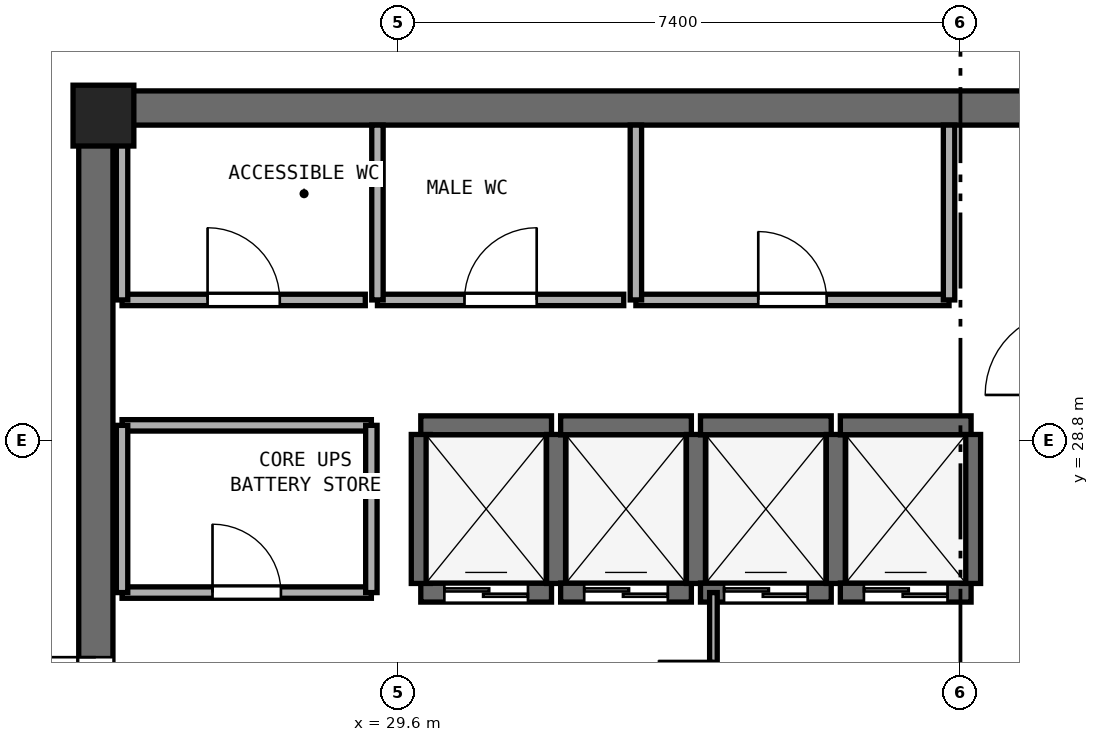
"""IFC4 building model, lengths in metres.
Left out: names, types, materials, properties, quantities, classifications, styles, units other than length and angle.
Written with IfcOpenShell. Run it as: python <this file> out.ifc"""

import sys

from ifc_helpers import new_model, si_unit, direction, frame, frame_2d, origin, origin_2d, place, context, subcontext, project, spatial, rectangle, extrude, element, fill, save


model = new_model("IFC4")
c1 = context("Model", 3, precision=1e-05, world=origin(), true_north=direction((0.0, 1.0)))
c2 = subcontext(c1, "Body", "Model", "MODEL_VIEW")
j1 = project(units=[si_unit("LENGTHUNIT", "METRE"), si_unit("PLANEANGLEUNIT", "RADIAN")], contexts=[c1])
p1 = place(None, origin())
s1 = spatial("IfcSite", under=j1, at=p1, CompositionType="ELEMENT")
p2 = place(p1, origin())
s2 = spatial("IfcBuilding", under=s1, at=p2, CompositionType="ELEMENT")
p3 = place(p2, frame((0.0, 0.0, 251.6)))
s3 = spatial("IfcBuildingStorey", under=s2, at=p3, CompositionType="ELEMENT", Elevation=251.6)
p4 = place(p3, frame((25.4, 33.175, 0.0), z_axis=(0.0, 0.0, 1.0), x_axis=(1.0, 0.0, 0.0)))
e1 = element("IfcWall", 1, at=p4, inside=s3, PredefinedType="SHEAR", context=c2, shape_type="SweptSolid", body=[
    extrude(rectangle(XDim=23.2, YDim=0.45, at=frame_2d((11.6, 0.0))), origin(), (0.0, 0.0, 1.0), 3.51),
])
p5 = place(p3, frame((25.625, 17.45, 0.0), z_axis=(0.0, 0.0, 1.0), x_axis=(0.0, 1.0, 0.0)))
e2 = element("IfcWall", 2, at=p5, inside=s3, PredefinedType="SHEAR", context=c2, shape_type="SweptSolid", body=[
    extrude(rectangle(XDim=15.5, YDim=0.45, at=frame_2d((7.75, 0.0))), origin(), (0.0, 0.0, 1.0), 3.51),
])
p6 = place(p5, frame((7.0, 0.0, 0.0)))
e3 = element("IfcOpeningElement", 3, at=p6, cuts=e2, PredefinedType="OPENING", context=c2, shape_type="SweptSolid", body=[
    extrude(rectangle(XDim=1.5, YDim=2.15, at=frame_2d((0.75, 1.075))), frame((0.0, 0.235, 0.0), z_axis=(0.0, -1.0, 0.0), x_axis=(1.0, 0.0, 0.0)), (0.0, 0.0, 1.0), 0.47),
])
p7 = place(p3, frame((25.725, 33.075, 0.0), z_axis=(0.0, 0.0, 1.0), x_axis=(1.0, 0.0, 0.0)))
e4 = element("IfcColumn", 4, at=p7, inside=s3, PredefinedType="PILASTER", context=c2, shape_type="SweptSolid", body=[
    extrude(rectangle(XDim=0.8, YDim=0.8, at=origin_2d()), origin(), (0.0, 0.0, 1.0), 3.8),
])
p8 = place(p3, frame((29.9, 26.8, 0.0), z_axis=(0.0, 0.0, 1.0), x_axis=(1.0, 0.0, 0.0)))
e5 = element("IfcWall", 5, at=p8, inside=s3, PredefinedType="SHEAR", context=c2, shape_type="SweptSolid", body=[
    extrude(rectangle(XDim=1.72, YDim=0.25, at=frame_2d((0.86, 0.0))), origin(), (0.0, 0.0, 1.0), 3.51),
])
p9 = place(p8, frame((0.31, 0.0, 0.0)))
e6 = element("IfcOpeningElement", 6, at=p9, cuts=e5, PredefinedType="OPENING", context=c2, shape_type="SweptSolid", body=[
    extrude(rectangle(XDim=1.1, YDim=2.15, at=frame_2d((0.55, 1.075))), frame((0.0, 0.135, 0.0), z_axis=(0.0, -1.0, 0.0), x_axis=(1.0, 0.0, 0.0)), (0.0, 0.0, 1.0), 0.27),
])
p10 = place(p3, frame((29.9, 29.0, 0.0), z_axis=(0.0, 0.0, 1.0), x_axis=(1.0, 0.0, 0.0)))
e7 = element("IfcWall", 7, at=p10, inside=s3, PredefinedType="SHEAR", context=c2, shape_type="SweptSolid", body=[
    extrude(rectangle(XDim=1.72, YDim=0.25, at=frame_2d((0.86, 0.0))), origin(), (0.0, 0.0, 1.0), 3.51),
])
for number, where, z_axis, x_axis in (
    (8, (29.9, 26.92, 0.0), (0.0, 0.0, 1.0), (0.0, 1.0, 0.0)),
    (9, (31.68, 26.92, 0.0), (0.0, 0.0, 1.0), (0.0, 1.0, 0.0)),
):
    element("IfcWall", number, at=place(p3, frame(where, z_axis=z_axis, x_axis=x_axis)), inside=s3, PredefinedType="SHEAR", context=c2, shape_type="SweptSolid", body=[
        extrude(rectangle(XDim=1.96, YDim=0.25, at=frame_2d((0.98, 0.0))), origin(), (0.0, 0.0, 1.0), 3.51),
    ])
p11 = place(p3, frame((31.74, 26.8, 0.0), z_axis=(0.0, 0.0, 1.0), x_axis=(1.0, 0.0, 0.0)))
e10 = element("IfcWall", 10, at=p11, inside=s3, PredefinedType="SHEAR", context=c2, shape_type="SweptSolid", body=[
    extrude(rectangle(XDim=1.72, YDim=0.25, at=frame_2d((0.86, 0.0))), origin(), (0.0, 0.0, 1.0), 3.51),
])
p12 = place(p11, frame((0.31, 0.0, 0.0)))
e11 = element("IfcOpeningElement", 11, at=p12, cuts=e10, PredefinedType="OPENING", context=c2, shape_type="SweptSolid", body=[
    extrude(rectangle(XDim=1.1, YDim=2.15, at=frame_2d((0.55, 1.075))), frame((0.0, 0.135, 0.0), z_axis=(0.0, -1.0, 0.0), x_axis=(1.0, 0.0, 0.0)), (0.0, 0.0, 1.0), 0.27),
])
p13 = place(p3, frame((31.74, 29.0, 0.0), z_axis=(0.0, 0.0, 1.0), x_axis=(1.0, 0.0, 0.0)))
e12 = element("IfcWall", 12, at=p13, inside=s3, PredefinedType="SHEAR", context=c2, shape_type="SweptSolid", body=[
    extrude(rectangle(XDim=1.72, YDim=0.25, at=frame_2d((0.86, 0.0))), origin(), (0.0, 0.0, 1.0), 3.51),
])
p14 = place(p3, frame((33.52, 26.92, 0.0), z_axis=(0.0, 0.0, 1.0), x_axis=(0.0, 1.0, 0.0)))
e13 = element("IfcWall", 13, at=p14, inside=s3, PredefinedType="SHEAR", context=c2, shape_type="SweptSolid", body=[
    extrude(rectangle(XDim=1.96, YDim=0.25, at=frame_2d((0.98, 0.0))), origin(), (0.0, 0.0, 1.0), 3.51),
])
p15 = place(p3, frame((33.58, 26.8, 0.0), z_axis=(0.0, 0.0, 1.0), x_axis=(1.0, 0.0, 0.0)))
e14 = element("IfcWall", 14, at=p15, inside=s3, PredefinedType="SHEAR", context=c2, shape_type="SweptSolid", body=[
    extrude(rectangle(XDim=1.72, YDim=0.25, at=frame_2d((0.86, 0.0))), origin(), (0.0, 0.0, 1.0), 3.51),
])
p16 = place(p15, frame((0.31, 0.0, 0.0)))
e15 = element("IfcOpeningElement", 15, at=p16, cuts=e14, PredefinedType="OPENING", context=c2, shape_type="SweptSolid", body=[
    extrude(rectangle(XDim=1.1, YDim=2.15, at=frame_2d((0.55, 1.075))), frame((0.0, 0.135, 0.0), z_axis=(0.0, -1.0, 0.0), x_axis=(1.0, 0.0, 0.0)), (0.0, 0.0, 1.0), 0.27),
])
p17 = place(p3, frame((33.58, 29.0, 0.0), z_axis=(0.0, 0.0, 1.0), x_axis=(1.0, 0.0, 0.0)))
e16 = element("IfcWall", 16, at=p17, inside=s3, PredefinedType="SHEAR", context=c2, shape_type="SweptSolid", body=[
    extrude(rectangle(XDim=1.72, YDim=0.25, at=frame_2d((0.86, 0.0))), origin(), (0.0, 0.0, 1.0), 3.51),
])
p18 = place(p3, frame((35.36, 26.92, 0.0), z_axis=(0.0, 0.0, 1.0), x_axis=(0.0, 1.0, 0.0)))
e17 = element("IfcWall", 17, at=p18, inside=s3, PredefinedType="SHEAR", context=c2, shape_type="SweptSolid", body=[
    extrude(rectangle(XDim=1.96, YDim=0.25, at=frame_2d((0.98, 0.0))), origin(), (0.0, 0.0, 1.0), 3.51),
])
p19 = place(p3, frame((35.42, 26.8, 0.0), z_axis=(0.0, 0.0, 1.0), x_axis=(1.0, 0.0, 0.0)))
e18 = element("IfcWall", 18, at=p19, inside=s3, PredefinedType="SHEAR", context=c2, shape_type="SweptSolid", body=[
    extrude(rectangle(XDim=1.72, YDim=0.25, at=frame_2d((0.86, 0.0))), origin(), (0.0, 0.0, 1.0), 3.51),
])
p20 = place(p19, frame((0.31, 0.0, 0.0)))
e19 = element("IfcOpeningElement", 19, at=p20, cuts=e18, PredefinedType="OPENING", context=c2, shape_type="SweptSolid", body=[
    extrude(rectangle(XDim=1.1, YDim=2.15, at=frame_2d((0.55, 1.075))), frame((0.0, 0.135, 0.0), z_axis=(0.0, -1.0, 0.0), x_axis=(1.0, 0.0, 0.0)), (0.0, 0.0, 1.0), 0.27),
])
p21 = place(p3, frame((35.42, 29.0, 0.0), z_axis=(0.0, 0.0, 1.0), x_axis=(1.0, 0.0, 0.0)))
e20 = element("IfcWall", 20, at=p21, inside=s3, PredefinedType="SHEAR", context=c2, shape_type="SweptSolid", body=[
    extrude(rectangle(XDim=1.72, YDim=0.25, at=frame_2d((0.86, 0.0))), origin(), (0.0, 0.0, 1.0), 3.51),
])
p22 = place(p3, frame((37.14, 26.92, 0.0), z_axis=(0.0, 0.0, 1.0), x_axis=(0.0, 1.0, 0.0)))
e21 = element("IfcWall", 21, at=p22, inside=s3, PredefinedType="SHEAR", context=c2, shape_type="SweptSolid", body=[
    extrude(rectangle(XDim=1.96, YDim=0.25, at=frame_2d((0.98, 0.0))), origin(), (0.0, 0.0, 1.0), 3.51),
])
p23 = place(p3, frame((25.97, 30.65, 0.0), z_axis=(0.0, 0.0, 1.0), x_axis=(1.0, 0.0, 0.0)))
e22 = element("IfcWall", 22, at=p23, inside=s3, PredefinedType="PARTITIONING", context=c2, shape_type="SweptSolid", body=[
    extrude(rectangle(XDim=3.2, YDim=0.15, at=frame_2d((1.6, 0.0))), origin(), (0.0, 0.0, 1.0), 3.51),
])
p24 = place(p23, frame((1.125, 0.0, 0.0)))
e23 = element("IfcOpeningElement", 23, at=p24, cuts=e22, PredefinedType="OPENING", context=c2, shape_type="SweptSolid", body=[
    extrude(rectangle(XDim=0.95, YDim=2.1, at=frame_2d((0.475, 1.05))), frame((0.0, 0.085, 0.0), z_axis=(0.0, -1.0, 0.0), x_axis=(1.0, 0.0, 0.0)), (0.0, 0.0, 1.0), 0.17),
])
p25 = place(p3, frame((25.97, 30.65, 0.0), z_axis=(0.0, 0.0, 1.0), x_axis=(0.0, 1.0, 0.0)))
e24 = element("IfcWall", 24, at=p25, inside=s3, PredefinedType="PARTITIONING", context=c2, shape_type="SweptSolid", body=[
    extrude(rectangle(XDim=2.3, YDim=0.15, at=frame_2d((1.15, 0.0))), origin(), (0.0, 0.0, 1.0), 2.61),
])
p26 = place(p3, frame((29.33, 30.65, 0.0), z_axis=(0.0, 0.0, 1.0), x_axis=(1.0, 0.0, 0.0)))
e25 = element("IfcWall", 25, at=p26, inside=s3, PredefinedType="PARTITIONING", context=c2, shape_type="SweptSolid", body=[
    extrude(rectangle(XDim=3.24, YDim=0.15, at=frame_2d((1.62, 0.0))), origin(), (0.0, 0.0, 1.0), 3.51),
])
p27 = place(p26, frame((1.145, 0.0, 0.0)))
e26 = element("IfcOpeningElement", 26, at=p27, cuts=e25, PredefinedType="OPENING", context=c2, shape_type="SweptSolid", body=[
    extrude(rectangle(XDim=0.95, YDim=2.1, at=frame_2d((0.475, 1.05))), frame((0.0, 0.085, 0.0), z_axis=(0.0, -1.0, 0.0), x_axis=(1.0, 0.0, 0.0)), (0.0, 0.0, 1.0), 0.17),
])
p28 = place(p3, frame((29.33, 30.65, 0.0), z_axis=(0.0, 0.0, 1.0), x_axis=(0.0, 1.0, 0.0)))
e27 = element("IfcWall", 27, at=p28, inside=s3, PredefinedType="PARTITIONING", context=c2, shape_type="SweptSolid", body=[
    extrude(rectangle(XDim=2.3, YDim=0.15, at=frame_2d((1.15, 0.0))), origin(), (0.0, 0.0, 1.0), 3.51),
])
p29 = place(p3, frame((32.73, 30.65, 0.0), z_axis=(0.0, 0.0, 1.0), x_axis=(1.0, 0.0, 0.0)))
e28 = element("IfcWall", 28, at=p29, inside=s3, PredefinedType="PARTITIONING", context=c2, shape_type="SweptSolid", body=[
    extrude(rectangle(XDim=4.12, YDim=0.15, at=frame_2d((2.06, 0.0))), origin(), (0.0, 0.0, 1.0), 3.51),
])
p30 = place(p29, frame((1.61, 0.0, 0.0)))
e29 = element("IfcOpeningElement", 29, at=p30, cuts=e28, PredefinedType="OPENING", context=c2, shape_type="SweptSolid", body=[
    extrude(rectangle(XDim=0.9, YDim=2.1, at=frame_2d((0.45, 1.05))), frame((0.0, 0.085, 0.0), z_axis=(0.0, -1.0, 0.0), x_axis=(1.0, 0.0, 0.0)), (0.0, 0.0, 1.0), 0.17),
])
for number, where, z_axis, x_axis in (
    (30, (32.73, 30.65, 0.0), (0.0, 0.0, 1.0), (0.0, 1.0, 0.0)),
    (31, (36.85, 30.65, 0.0), (0.0, 0.0, 1.0), (0.0, 1.0, 0.0)),
):
    element("IfcWall", number, at=place(p3, frame(where, z_axis=z_axis, x_axis=x_axis)), inside=s3, PredefinedType="PARTITIONING", context=c2, shape_type="SweptSolid", body=[
        extrude(rectangle(XDim=2.3, YDim=0.15, at=frame_2d((1.15, 0.0))), origin(), (0.0, 0.0, 1.0), 3.51),
    ])
p31 = place(p3, frame((25.97, 26.8, 0.0), z_axis=(0.0, 0.0, 1.0), x_axis=(1.0, 0.0, 0.0)))
e32 = element("IfcWall", 32, at=p31, inside=s3, PredefinedType="PARTITIONING", context=c2, shape_type="SweptSolid", body=[
    extrude(rectangle(XDim=3.28, YDim=0.15, at=frame_2d((1.64, 0.0))), origin(), (0.0, 0.0, 1.0), 3.51),
])
p32 = place(p31, frame((1.19, 0.0, 0.0)))
e33 = element("IfcOpeningElement", 33, at=p32, cuts=e32, PredefinedType="OPENING", context=c2, shape_type="SweptSolid", body=[
    extrude(rectangle(XDim=0.9, YDim=2.1, at=frame_2d((0.45, 1.05))), frame((0.0, 0.085, 0.0), z_axis=(0.0, -1.0, 0.0), x_axis=(1.0, 0.0, 0.0)), (0.0, 0.0, 1.0), 0.17),
])
p33 = place(p3, frame((25.97, 29.0, 0.0), z_axis=(0.0, 0.0, 1.0), x_axis=(1.0, 0.0, 0.0)))
e34 = element("IfcWall", 34, at=p33, inside=s3, PredefinedType="PARTITIONING", context=c2, shape_type="SweptSolid", body=[
    extrude(rectangle(XDim=3.28, YDim=0.15, at=frame_2d((1.64, 0.0))), origin(), (0.0, 0.0, 1.0), 3.51),
])
p34 = place(p3, frame((25.97, 26.8, 0.0), z_axis=(0.0, 0.0, 1.0), x_axis=(0.0, 1.0, 0.0)))
e35 = element("IfcWall", 35, at=p34, inside=s3, PredefinedType="PARTITIONING", context=c2, shape_type="SweptSolid", body=[
    extrude(rectangle(XDim=2.2, YDim=0.15, at=frame_2d((1.1, 0.0))), origin(), (0.0, 0.0, 1.0), 2.61),
])
p35 = place(p3, frame((29.25, 26.8, 0.0), z_axis=(0.0, 0.0, 1.0), x_axis=(0.0, 1.0, 0.0)))
e36 = element("IfcWall", 36, at=p35, inside=s3, PredefinedType="PARTITIONING", context=c2, shape_type="SweptSolid", body=[
    extrude(rectangle(XDim=2.2, YDim=0.15, at=frame_2d((1.1, 0.0))), origin(), (0.0, 0.0, 1.0), 3.51),
])
p36 = place(p3, frame((33.75, 23.6, 0.0), z_axis=(0.0, 0.0, 1.0), x_axis=(0.0, 1.0, 0.0)))
e37 = element("IfcWall", 37, at=p36, inside=s3, PredefinedType="PARTITIONING", context=c2, shape_type="SweptSolid", body=[
    extrude(rectangle(XDim=3.2, YDim=0.1, at=frame_2d((1.6, 0.0))), origin(), (0.0, 0.0, 1.0), 3.51),
])
p37 = place(p36, frame((0.85, 0.0, 0.0)))
e38 = element("IfcOpeningElement", 38, at=p37, cuts=e37, PredefinedType="OPENING", context=c2, shape_type="SweptSolid", body=[
    extrude(rectangle(XDim=1.45, YDim=2.12, at=frame_2d((0.725, 1.06))), frame((0.0, 0.06, 0.0), z_axis=(0.0, -1.0, 0.0), x_axis=(1.0, 0.0, 0.0)), (0.0, 0.0, 1.0), 0.12),
])
p38 = place(p9, origin())
e39 = element("IfcDoor", 39, at=p38, inside=s3, OperationType="DOUBLE_DOOR_SLIDING", PredefinedType="DOOR", context=c2, shape_type="SweptSolid", body=[
    extrude(rectangle(XDim=1.1, YDim=2.15, at=frame_2d((0.55, 1.075))), frame((0.0, 0.025, 0.0), z_axis=(0.0, -1.0, 0.0), x_axis=(1.0, 0.0, 0.0)), (0.0, 0.0, 1.0), 0.05),
])
fill(e6, e39)
p39 = place(p12, origin())
e40 = element("IfcDoor", 40, at=p39, inside=s3, OperationType="DOUBLE_DOOR_SLIDING", PredefinedType="DOOR", context=c2, shape_type="SweptSolid", body=[
    extrude(rectangle(XDim=1.1, YDim=2.15, at=frame_2d((0.55, 1.075))), frame((0.0, 0.025, 0.0), z_axis=(0.0, -1.0, 0.0), x_axis=(1.0, 0.0, 0.0)), (0.0, 0.0, 1.0), 0.05),
])
fill(e11, e40)
p40 = place(p16, origin())
e41 = element("IfcDoor", 41, at=p40, inside=s3, OperationType="DOUBLE_DOOR_SLIDING", PredefinedType="DOOR", context=c2, shape_type="SweptSolid", body=[
    extrude(rectangle(XDim=1.1, YDim=2.15, at=frame_2d((0.55, 1.075))), frame((0.0, 0.025, 0.0), z_axis=(0.0, -1.0, 0.0), x_axis=(1.0, 0.0, 0.0)), (0.0, 0.0, 1.0), 0.05),
])
fill(e15, e41)
p41 = place(p20, origin())
e42 = element("IfcDoor", 42, at=p41, inside=s3, OperationType="DOUBLE_DOOR_SLIDING", PredefinedType="DOOR", context=c2, shape_type="SweptSolid", body=[
    extrude(rectangle(XDim=1.1, YDim=2.15, at=frame_2d((0.55, 1.075))), frame((0.0, 0.025, 0.0), z_axis=(0.0, -1.0, 0.0), x_axis=(1.0, 0.0, 0.0)), (0.0, 0.0, 1.0), 0.05),
])
fill(e19, e42)
p42 = place(p6, origin())
e43 = element("IfcDoor", 43, at=p42, inside=s3, OperationType="DOUBLE_DOOR_SINGLE_SWING", PredefinedType="DOOR", context=c2, shape_type="SweptSolid", body=[
    extrude(rectangle(XDim=1.5, YDim=2.15, at=frame_2d((0.75, 1.075))), frame((0.0, 0.025, 0.0), z_axis=(0.0, -1.0, 0.0), x_axis=(1.0, 0.0, 0.0)), (0.0, 0.0, 1.0), 0.05),
])
fill(e3, e43)
p43 = place(p24, origin())
e44 = element("IfcDoor", 44, at=p43, inside=s3, OperationType="SINGLE_SWING_LEFT", PredefinedType="DOOR", context=c2, shape_type="SweptSolid", body=[
    extrude(rectangle(XDim=0.95, YDim=2.1, at=frame_2d((0.475, 1.05))), frame((0.0, 0.025, 0.0), z_axis=(0.0, -1.0, 0.0), x_axis=(1.0, 0.0, 0.0)), (0.0, 0.0, 1.0), 0.05),
])
fill(e23, e44)
p44 = place(p27, origin())
e45 = element("IfcDoor", 45, at=p44, inside=s3, OperationType="SINGLE_SWING_RIGHT", PredefinedType="DOOR", context=c2, shape_type="SweptSolid", body=[
    extrude(rectangle(XDim=0.95, YDim=2.1, at=frame_2d((0.475, 1.05))), frame((0.0, 0.025, 0.0), z_axis=(0.0, -1.0, 0.0), x_axis=(1.0, 0.0, 0.0)), (0.0, 0.0, 1.0), 0.05),
])
fill(e26, e45)
p45 = place(p30, origin())
e46 = element("IfcDoor", 46, at=p45, inside=s3, OperationType="SINGLE_SWING_LEFT", PredefinedType="DOOR", context=c2, shape_type="SweptSolid", body=[
    extrude(rectangle(XDim=0.9, YDim=2.1, at=frame_2d((0.45, 1.05))), frame((0.0, 0.025, 0.0), z_axis=(0.0, -1.0, 0.0), x_axis=(1.0, 0.0, 0.0)), (0.0, 0.0, 1.0), 0.05),
])
fill(e29, e46)
p46 = place(p32, origin())
e47 = element("IfcDoor", 47, at=p46, inside=s3, OperationType="SINGLE_SWING_LEFT", PredefinedType="DOOR", context=c2, shape_type="SweptSolid", body=[
    extrude(rectangle(XDim=0.9, YDim=2.1, at=frame_2d((0.45, 1.05))), frame((0.0, 0.025, 0.0), z_axis=(0.0, -1.0, 0.0), x_axis=(1.0, 0.0, 0.0)), (0.0, 0.0, 1.0), 0.05),
])
fill(e33, e47)
p47 = place(p37, origin())
e48 = element("IfcDoor", 48, at=p47, inside=s3, OperationType="DOUBLE_DOOR_SINGLE_SWING", PredefinedType="DOOR", context=c2, shape_type="SweptSolid", body=[
    extrude(rectangle(XDim=1.45, YDim=2.12, at=frame_2d((0.725, 1.06))), frame((0.0, 0.025, 0.0), z_axis=(0.0, -1.0, 0.0), x_axis=(1.0, 0.0, 0.0)), (0.0, 0.0, 1.0), 0.05),
])
fill(e38, e48)
save(model, sys.argv[1])
